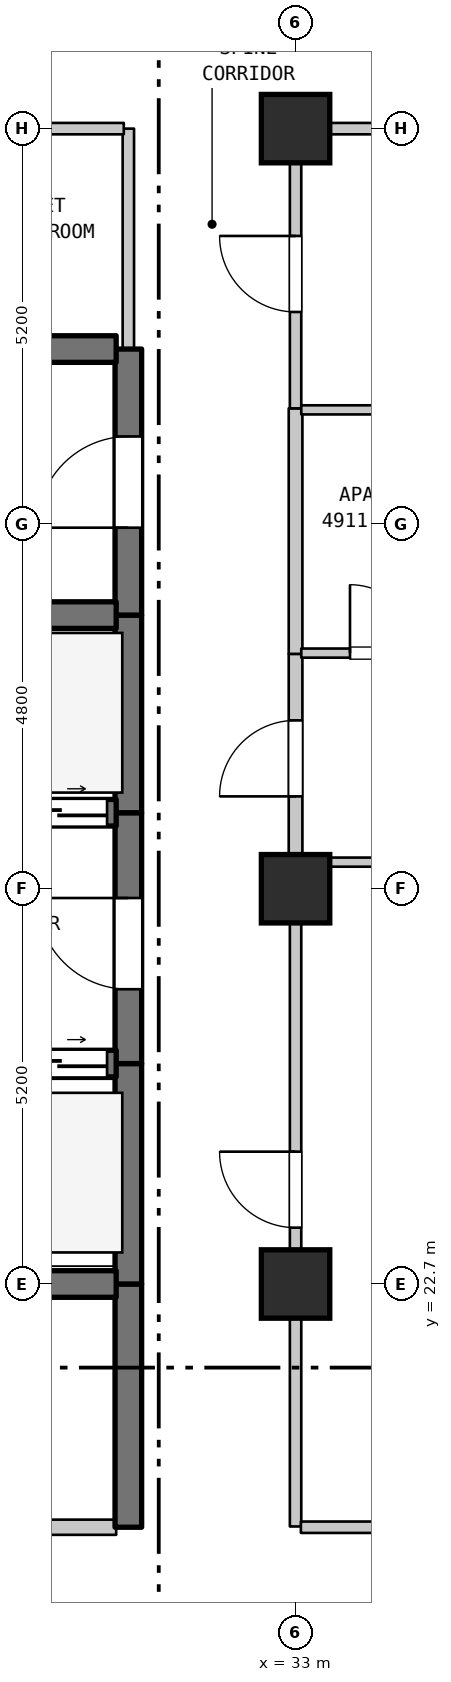
"""IFC4 building model, lengths in metres.
Left out: names, types, materials, properties, quantities, classifications, styles, units other than length and angle.
Written with IfcOpenShell. Run it as: python <this file> out.ifc"""

import sys

from ifc_helpers import new_model, si_unit, direction, frame, frame_2d, origin, origin_2d, place, context, subcontext, project, spatial, rectangle, extrude, element, fill, save


model = new_model("IFC4")
c1 = context("Model", 3, precision=1e-05, world=origin(), true_north=direction((0.0, 1.0)))
c2 = subcontext(c1, "Body", "Model", "MODEL_VIEW")
j1 = project(units=[si_unit("LENGTHUNIT", "METRE"), si_unit("PLANEANGLEUNIT", "RADIAN")], contexts=[c1])
p1 = place(None, origin())
s1 = spatial("IfcSite", under=j1, at=p1, CompositionType="ELEMENT")
p2 = place(p1, origin())
s2 = spatial("IfcBuilding", under=s1, at=p2, CompositionType="ELEMENT")
p3 = place(p2, frame((0.0, 0.0, 199.5)))
s3 = spatial("IfcBuildingStorey", under=s2, at=p3, CompositionType="ELEMENT", Elevation=199.5)
for number, where, z_axis, x_axis in (
    (1, (33.0, 22.7, 0.0), (0.0, 0.0, 1.0), (1.0, 0.0, 0.0)),
    (2, (33.0, 27.9, 0.0), (0.0, 0.0, 1.0), (1.0, 0.0, 0.0)),
    (3, (33.0, 37.9, 0.0), (0.0, 0.0, 1.0), (1.0, 0.0, 0.0)),
):
    element("IfcColumn", number, at=place(p3, frame(where, z_axis=z_axis, x_axis=x_axis)), inside=s3, PredefinedType="COLUMN", context=c2, shape_type="SweptSolid", body=[
        extrude(rectangle(XDim=0.9, YDim=0.9, at=origin_2d()), origin(), (0.0, 0.0, 1.0), 3.7),
    ])
p4 = place(p3, frame((30.8, 19.5, 0.0), z_axis=(0.0, 0.0, 1.0), x_axis=(0.0, 1.0, 0.0)))
e4 = element("IfcWall", 4, at=p4, inside=s3, PredefinedType="SHEAR", context=c2, shape_type="SweptSolid", body=[
    extrude(rectangle(XDim=3.2, YDim=0.35, at=frame_2d((1.6, 0.0))), origin(), (0.0, 0.0, 1.0), 3.39),
])
p5 = place(p3, frame((30.8, 22.7, 0.0), z_axis=(0.0, 0.0, 1.0), x_axis=(0.0, 1.0, 0.0)))
e5 = element("IfcWall", 5, at=p5, inside=s3, PredefinedType="SHEAR", context=c2, shape_type="SweptSolid", body=[
    extrude(rectangle(XDim=2.9, YDim=0.35, at=frame_2d((1.45, 0.0))), origin(), (0.0, 0.0, 1.0), 3.39),
])
p6 = place(p3, frame((30.8, 25.6, 0.0), z_axis=(0.0, 0.0, 1.0), x_axis=(0.0, 1.0, 0.0)))
e6 = element("IfcWall", 6, at=p6, inside=s3, PredefinedType="SHEAR", context=c2, shape_type="SweptSolid", body=[
    extrude(rectangle(XDim=3.3, YDim=0.35, at=frame_2d((1.65, 0.0))), origin(), (0.0, 0.0, 1.0), 3.39),
])
p7 = place(p6, frame((0.978, 0.0, 0.0)))
e7 = element("IfcOpeningElement", 7, at=p7, cuts=e6, PredefinedType="OPENING", context=c2, shape_type="SweptSolid", body=[
    extrude(rectangle(XDim=1.2, YDim=2.2, at=frame_2d((0.6, 1.1))), frame((0.0, 0.185, 0.0), z_axis=(0.0, -1.0, 0.0), x_axis=(1.0, 0.0, 0.0)), (0.0, 0.0, 1.0), 0.37),
])
p8 = place(p3, frame((30.8, 28.9, 0.0), z_axis=(0.0, 0.0, 1.0), x_axis=(0.0, 1.0, 0.0)))
e8 = element("IfcWall", 8, at=p8, inside=s3, PredefinedType="SHEAR", context=c2, shape_type="SweptSolid", body=[
    extrude(rectangle(XDim=2.6, YDim=0.35, at=frame_2d((1.3, 0.0))), origin(), (0.0, 0.0, 1.0), 3.39),
])
p9 = place(p3, frame((30.8, 31.5, 0.0), z_axis=(0.0, 0.0, 1.0), x_axis=(0.0, 1.0, 0.0)))
e9 = element("IfcWall", 9, at=p9, inside=s3, PredefinedType="SHEAR", context=c2, shape_type="SweptSolid", body=[
    extrude(rectangle(XDim=3.5, YDim=0.35, at=frame_2d((1.75, 0.0))), origin(), (0.0, 0.0, 1.0), 3.39),
])
p10 = place(p9, frame((1.15, 0.0, 0.0)))
e10 = element("IfcOpeningElement", 10, at=p10, cuts=e9, PredefinedType="OPENING", context=c2, shape_type="SweptSolid", body=[
    extrude(rectangle(XDim=1.2, YDim=2.2, at=frame_2d((0.6, 1.1))), frame((0.0, 0.185, 0.0), z_axis=(0.0, -1.0, 0.0), x_axis=(1.0, 0.0, 0.0)), (0.0, 0.0, 1.0), 0.37),
])
p11 = place(p3, frame((30.8, 35.0, 0.0), z_axis=(0.0, 0.0, 1.0), x_axis=(0.0, 1.0, 0.0)))
e11 = element("IfcWall", 11, at=p11, inside=s3, PredefinedType="STANDARD", context=c2, shape_type="SweptSolid", body=[
    extrude(rectangle(XDim=2.9, YDim=0.15, at=frame_2d((1.45, 0.0))), origin(), (0.0, 0.0, 1.0), 3.39),
])
p12 = place(p3, frame((33.0, 19.51, 0.0), z_axis=(0.0, 0.0, 1.0), x_axis=(0.0, 1.0, 0.0)))
e12 = element("IfcWall", 12, at=p12, inside=s3, PredefinedType="STANDARD", context=c2, shape_type="SweptSolid", body=[
    extrude(rectangle(XDim=8.72, YDim=0.15, at=frame_2d((4.36, 0.0))), origin(), (0.0, 0.0, 1.0), 2.99),
])
p13 = place(p12, frame((3.931, 0.0, 0.0)))
e13 = element("IfcOpeningElement", 13, at=p13, cuts=e12, PredefinedType="OPENING", context=c2, shape_type="SweptSolid", body=[
    extrude(rectangle(XDim=1.0, YDim=2.15, at=frame_2d((0.5, 1.075))), frame((0.0, 0.085, 0.0), z_axis=(0.0, -1.0, 0.0), x_axis=(1.0, 0.0, 0.0)), (0.0, 0.0, 1.0), 0.17),
])
p14 = place(p3, frame((33.0, 28.24, 0.0), z_axis=(0.0, 0.0, 1.0), x_axis=(0.0, 1.0, 0.0)))
e14 = element("IfcWall", 14, at=p14, inside=s3, PredefinedType="STANDARD", context=c2, shape_type="SweptSolid", body=[
    extrude(rectangle(XDim=2.75, YDim=0.18, at=frame_2d((1.375, 0.0))), origin(), (0.0, 0.0, 1.0), 2.89),
])
p15 = place(p14, frame((0.875, 0.0, 0.0)))
e15 = element("IfcOpeningElement", 15, at=p15, cuts=e14, PredefinedType="OPENING", context=c2, shape_type="SweptSolid", body=[
    extrude(rectangle(XDim=1.0, YDim=2.15, at=frame_2d((0.5, 1.075))), frame((0.0, 0.1, 0.0), z_axis=(0.0, -1.0, 0.0), x_axis=(1.0, 0.0, 0.0)), (0.0, 0.0, 1.0), 0.2),
])
p16 = place(p3, frame((33.0, 30.99, 0.0), z_axis=(0.0, 0.0, 1.0), x_axis=(0.0, 1.0, 0.0)))
e16 = element("IfcWall", 16, at=p16, inside=s3, PredefinedType="STANDARD", context=c2, shape_type="SweptSolid", body=[
    extrude(rectangle(XDim=3.23, YDim=0.18, at=frame_2d((1.615, 0.0))), origin(), (0.0, 0.0, 1.0), 2.89),
])
p17 = place(p3, frame((33.0, 34.22, 0.0), z_axis=(0.0, 0.0, 1.0), x_axis=(0.0, 1.0, 0.0)))
e17 = element("IfcWall", 17, at=p17, inside=s3, PredefinedType="STANDARD", context=c2, shape_type="SweptSolid", body=[
    extrude(rectangle(XDim=3.68, YDim=0.15, at=frame_2d((1.84, 0.0))), origin(), (0.0, 0.0, 1.0), 2.89),
])
p18 = place(p17, frame((1.268, 0.0, 0.0)))
e18 = element("IfcOpeningElement", 18, at=p18, cuts=e17, PredefinedType="OPENING", context=c2, shape_type="SweptSolid", body=[
    extrude(rectangle(XDim=1.0, YDim=2.15, at=frame_2d((0.5, 1.075))), frame((0.0, 0.085, 0.0), z_axis=(0.0, -1.0, 0.0), x_axis=(1.0, 0.0, 0.0)), (0.0, 0.0, 1.0), 0.17),
])
p19 = place(p3, frame((25.985, 19.5, 0.0), z_axis=(0.0, 0.0, 1.0), x_axis=(1.0, 0.0, 0.0)))
e19 = element("IfcWall", 19, at=p19, inside=s3, PredefinedType="STANDARD", context=c2, shape_type="SweptSolid", body=[
    extrude(rectangle(XDim=4.655, YDim=0.2, at=frame_2d((2.327, 0.0))), origin(), (0.0, 0.0, 1.0), 3.39),
])
p20 = place(p19, frame((1.845, 0.0, 0.0)))
e20 = element("IfcOpeningElement", 20, at=p20, cuts=e19, PredefinedType="OPENING", context=c2, shape_type="SweptSolid", body=[
    extrude(rectangle(XDim=0.9, YDim=2.15, at=frame_2d((0.45, 1.075))), frame((0.0, 0.11, 0.0), z_axis=(0.0, -1.0, 0.0), x_axis=(1.0, 0.0, 0.0)), (0.0, 0.0, 1.0), 0.22),
])
p21 = place(p3, frame((33.07, 19.5, 0.0), z_axis=(0.0, 0.0, 1.0), x_axis=(1.0, 0.0, 0.0)))
e21 = element("IfcWall", 21, at=p21, inside=s3, PredefinedType="STANDARD", context=c2, shape_type="SweptSolid", body=[
    extrude(rectangle(XDim=21.51, YDim=0.15, at=frame_2d((10.755, 0.0))), origin(), (0.0, 0.0, 1.0), 3.39),
])
p22 = place(p21, frame((10.185, 0.0, 0.0)))
e22 = element("IfcOpeningElement", 22, at=p22, cuts=e21, PredefinedType="OPENING", context=c2, shape_type="SweptSolid", body=[
    extrude(rectangle(XDim=1.0, YDim=2.15, at=frame_2d((0.5, 1.075))), frame((0.0, 0.085, 0.0), z_axis=(0.0, -1.0, 0.0), x_axis=(1.0, 0.0, 0.0)), (0.0, 0.0, 1.0), 0.17),
])
p23 = place(p3, frame((27.46, 22.7, 0.0), z_axis=(0.0, 0.0, 1.0), x_axis=(1.0, 0.0, 0.0)))
e23 = element("IfcWall", 23, at=p23, inside=s3, PredefinedType="SHEAR", context=c2, shape_type="SweptSolid", body=[
    extrude(rectangle(XDim=3.18, YDim=0.35, at=frame_2d((1.59, 0.0))), origin(), (0.0, 0.0, 1.0), 3.39),
])
p24 = place(p3, frame((27.46, 25.6, 0.0), z_axis=(0.0, 0.0, 1.0), x_axis=(1.0, 0.0, 0.0)))
e24 = element("IfcWall", 24, at=p24, inside=s3, PredefinedType="SHEAR", context=c2, shape_type="SweptSolid", body=[
    extrude(rectangle(XDim=3.18, YDim=0.35, at=frame_2d((1.59, 0.0))), origin(), (0.0, 0.0, 1.0), 3.39),
])
p25 = place(p24, frame((0.12, 0.0, 0.0)))
e25 = element("IfcOpeningElement", 25, at=p25, cuts=e24, PredefinedType="OPENING", context=c2, shape_type="SweptSolid", body=[
    extrude(rectangle(XDim=1.25, YDim=2.2, at=frame_2d((0.625, 1.1))), frame((0.0, 0.185, 0.0), z_axis=(0.0, -1.0, 0.0), x_axis=(1.0, 0.0, 0.0)), (0.0, 0.0, 1.0), 0.37),
])
p26 = place(p24, frame((1.81, 0.0, 0.0)))
e26 = element("IfcOpeningElement", 26, at=p26, cuts=e24, PredefinedType="OPENING", context=c2, shape_type="SweptSolid", body=[
    extrude(rectangle(XDim=1.25, YDim=2.2, at=frame_2d((0.625, 1.1))), frame((0.0, 0.185, 0.0), z_axis=(0.0, -1.0, 0.0), x_axis=(1.0, 0.0, 0.0)), (0.0, 0.0, 1.0), 0.37),
])
p27 = place(p3, frame((33.085, 28.25, 0.0), z_axis=(0.0, 0.0, 1.0), x_axis=(1.0, 0.0, 0.0)))
e27 = element("IfcWall", 27, at=p27, inside=s3, PredefinedType="PARTITIONING", context=c2, shape_type="SweptSolid", body=[
    extrude(rectangle(XDim=11.824, YDim=0.12, at=frame_2d((5.912, 0.0))), origin(), (0.0, 0.0, 1.0), 3.39),
])
p28 = place(p3, frame((27.46, 28.9, 0.0), z_axis=(0.0, 0.0, 1.0), x_axis=(1.0, 0.0, 0.0)))
e28 = element("IfcWall", 28, at=p28, inside=s3, PredefinedType="SHEAR", context=c2, shape_type="SweptSolid", body=[
    extrude(rectangle(XDim=3.18, YDim=0.35, at=frame_2d((1.59, 0.0))), origin(), (0.0, 0.0, 1.0), 3.39),
])
p29 = place(p28, frame((0.12, 0.0, 0.0)))
e29 = element("IfcOpeningElement", 29, at=p29, cuts=e28, PredefinedType="OPENING", context=c2, shape_type="SweptSolid", body=[
    extrude(rectangle(XDim=1.25, YDim=2.2, at=frame_2d((0.625, 1.1))), frame((0.0, 0.185, 0.0), z_axis=(0.0, -1.0, 0.0), x_axis=(1.0, 0.0, 0.0)), (0.0, 0.0, 1.0), 0.37),
])
p30 = place(p28, frame((1.81, 0.0, 0.0)))
e30 = element("IfcOpeningElement", 30, at=p30, cuts=e28, PredefinedType="OPENING", context=c2, shape_type="SweptSolid", body=[
    extrude(rectangle(XDim=1.25, YDim=2.2, at=frame_2d((0.625, 1.1))), frame((0.0, 0.185, 0.0), z_axis=(0.0, -1.0, 0.0), x_axis=(1.0, 0.0, 0.0)), (0.0, 0.0, 1.0), 0.37),
])
p31 = place(p3, frame((33.075, 31.0, 0.0), z_axis=(0.0, 0.0, 1.0), x_axis=(1.0, 0.0, 0.0)))
e31 = element("IfcWall", 31, at=p31, inside=s3, PredefinedType="PARTITIONING", context=c2, shape_type="SweptSolid", body=[
    extrude(rectangle(XDim=2.364, YDim=0.12, at=frame_2d((1.182, 0.0))), origin(), (0.0, 0.0, 1.0), 3.39),
])
p32 = place(p31, frame((0.641, 0.0, 0.0)))
e32 = element("IfcOpeningElement", 32, at=p32, cuts=e31, PredefinedType="OPENING", context=c2, shape_type="SweptSolid", body=[
    extrude(rectangle(XDim=0.9, YDim=2.15, at=frame_2d((0.45, 1.075))), frame((0.0, 0.07, 0.0), z_axis=(0.0, -1.0, 0.0), x_axis=(1.0, 0.0, 0.0)), (0.0, 0.0, 1.0), 0.14),
])
p33 = place(p3, frame((27.46, 31.5, 0.0), z_axis=(0.0, 0.0, 1.0), x_axis=(1.0, 0.0, 0.0)))
e33 = element("IfcWall", 33, at=p33, inside=s3, PredefinedType="SHEAR", context=c2, shape_type="SweptSolid", body=[
    extrude(rectangle(XDim=3.18, YDim=0.35, at=frame_2d((1.59, 0.0))), origin(), (0.0, 0.0, 1.0), 3.39),
])
p34 = place(p3, frame((33.075, 34.2, 0.0), z_axis=(0.0, 0.0, 1.0), x_axis=(1.0, 0.0, 0.0)))
e34 = element("IfcWall", 34, at=p34, inside=s3, PredefinedType="PARTITIONING", context=c2, shape_type="SweptSolid", body=[
    extrude(rectangle(XDim=2.364, YDim=0.12, at=frame_2d((1.182, 0.0))), origin(), (0.0, 0.0, 1.0), 3.39),
])
p35 = place(p3, frame((26.645, 35.0, 0.0), z_axis=(0.0, 0.0, 1.0), x_axis=(1.0, 0.0, 0.0)))
e35 = element("IfcWall", 35, at=p35, inside=s3, PredefinedType="SHEAR", context=c2, shape_type="SweptSolid", body=[
    extrude(rectangle(XDim=3.995, YDim=0.35, at=frame_2d((1.998, 0.0))), origin(), (0.0, 0.0, 1.0), 3.39),
])
p36 = place(p35, frame((1.508, 0.0, 0.0)))
e36 = element("IfcOpeningElement", 36, at=p36, cuts=e35, PredefinedType="OPENING", context=c2, shape_type="SweptSolid", body=[
    extrude(rectangle(XDim=0.95, YDim=2.15, at=frame_2d((0.475, 1.075))), frame((0.0, 0.185, 0.0), z_axis=(0.0, -1.0, 0.0), x_axis=(1.0, 0.0, 0.0)), (0.0, 0.0, 1.0), 0.37),
])
p37 = place(p3, frame((26.645, 37.9, 0.0), z_axis=(0.0, 0.0, 1.0), x_axis=(1.0, 0.0, 0.0)))
e37 = element("IfcWall", 37, at=p37, inside=s3, PredefinedType="STANDARD", context=c2, shape_type="SweptSolid", body=[
    extrude(rectangle(XDim=4.095, YDim=0.15, at=frame_2d((2.047, 0.0))), origin(), (0.0, 0.0, 1.0), 2.89),
])
p38 = place(p3, frame((33.06, 37.9, 0.0), z_axis=(0.0, 0.0, 1.0), x_axis=(1.0, 0.0, 0.0)))
e38 = element("IfcWall", 38, at=p38, inside=s3, PredefinedType="STANDARD", context=c2, shape_type="SweptSolid", body=[
    extrude(rectangle(XDim=7.164, YDim=0.15, at=frame_2d((3.582, 0.0))), origin(), (0.0, 0.0, 1.0), 3.39),
])
p39 = place(p38, frame((3.004, 0.0, 0.0)))
e39 = element("IfcOpeningElement", 39, at=p39, cuts=e38, PredefinedType="OPENING", context=c2, shape_type="SweptSolid", body=[
    extrude(rectangle(XDim=1.0, YDim=2.15, at=frame_2d((0.5, 1.075))), frame((0.0, 0.085, 0.0), z_axis=(0.0, -1.0, 0.0), x_axis=(1.0, 0.0, 0.0)), (0.0, 0.0, 1.0), 0.17),
])
p40 = place(p7, origin())
e40 = element("IfcDoor", 40, at=p40, inside=s3, OperationType="SINGLE_SWING_RIGHT", PredefinedType="DOOR", context=c2, shape_type="SweptSolid", body=[
    extrude(rectangle(XDim=1.2, YDim=2.2, at=frame_2d((0.6, 1.1))), frame((0.0, 0.025, 0.0), z_axis=(0.0, -1.0, 0.0), x_axis=(1.0, 0.0, 0.0)), (0.0, 0.0, 1.0), 0.05),
])
fill(e7, e40)
p41 = place(p10, origin())
e41 = element("IfcDoor", 41, at=p41, inside=s3, OperationType="SINGLE_SWING_LEFT", PredefinedType="DOOR", context=c2, shape_type="SweptSolid", body=[
    extrude(rectangle(XDim=1.2, YDim=2.2, at=frame_2d((0.6, 1.1))), frame((0.0, 0.025, 0.0), z_axis=(0.0, -1.0, 0.0), x_axis=(1.0, 0.0, 0.0)), (0.0, 0.0, 1.0), 0.05),
])
fill(e10, e41)
p42 = place(p13, origin())
e42 = element("IfcDoor", 42, at=p42, inside=s3, OperationType="SINGLE_SWING_RIGHT", PredefinedType="DOOR", context=c2, shape_type="SweptSolid", body=[
    extrude(rectangle(XDim=1.0, YDim=2.15, at=frame_2d((0.5, 1.075))), frame((0.0, 0.025, 0.0), z_axis=(0.0, -1.0, 0.0), x_axis=(1.0, 0.0, 0.0)), (0.0, 0.0, 1.0), 0.05),
])
fill(e13, e42)
p43 = place(p15, origin())
e43 = element("IfcDoor", 43, at=p43, inside=s3, OperationType="SINGLE_SWING_LEFT", PredefinedType="DOOR", context=c2, shape_type="SweptSolid", body=[
    extrude(rectangle(XDim=1.0, YDim=2.15, at=frame_2d((0.5, 1.075))), frame((0.0, 0.025, 0.0), z_axis=(0.0, -1.0, 0.0), x_axis=(1.0, 0.0, 0.0)), (0.0, 0.0, 1.0), 0.05),
])
fill(e15, e43)
p44 = place(p18, origin())
e44 = element("IfcDoor", 44, at=p44, inside=s3, OperationType="SINGLE_SWING_RIGHT", PredefinedType="DOOR", context=c2, shape_type="SweptSolid", body=[
    extrude(rectangle(XDim=1.0, YDim=2.15, at=frame_2d((0.5, 1.075))), frame((0.0, 0.025, 0.0), z_axis=(0.0, -1.0, 0.0), x_axis=(1.0, 0.0, 0.0)), (0.0, 0.0, 1.0), 0.05),
])
fill(e18, e44)
p45 = place(p26, origin())
e45 = element("IfcDoor", 45, at=p45, inside=s3, OperationType="DOUBLE_DOOR_SLIDING", PredefinedType="DOOR", context=c2, shape_type="SweptSolid", body=[
    extrude(rectangle(XDim=1.25, YDim=2.2, at=frame_2d((0.625, 1.1))), frame((0.0, 0.025, 0.0), z_axis=(0.0, -1.0, 0.0), x_axis=(1.0, 0.0, 0.0)), (0.0, 0.0, 1.0), 0.05),
])
fill(e26, e45)
p46 = place(p30, origin())
e46 = element("IfcDoor", 46, at=p46, inside=s3, OperationType="DOUBLE_DOOR_SLIDING", PredefinedType="DOOR", context=c2, shape_type="SweptSolid", body=[
    extrude(rectangle(XDim=1.25, YDim=2.2, at=frame_2d((0.625, 1.1))), frame((0.0, 0.025, 0.0), z_axis=(0.0, -1.0, 0.0), x_axis=(1.0, 0.0, 0.0)), (0.0, 0.0, 1.0), 0.05),
])
fill(e30, e46)
p47 = place(p32, origin())
e47 = element("IfcDoor", 47, at=p47, inside=s3, OperationType="SINGLE_SWING_LEFT", PredefinedType="DOOR", context=c2, shape_type="SweptSolid", body=[
    extrude(rectangle(XDim=0.9, YDim=2.15, at=frame_2d((0.45, 1.075))), frame((0.0, 0.025, 0.0), z_axis=(0.0, -1.0, 0.0), x_axis=(1.0, 0.0, 0.0)), (0.0, 0.0, 1.0), 0.05),
])
fill(e32, e47)
save(model, sys.argv[1])
